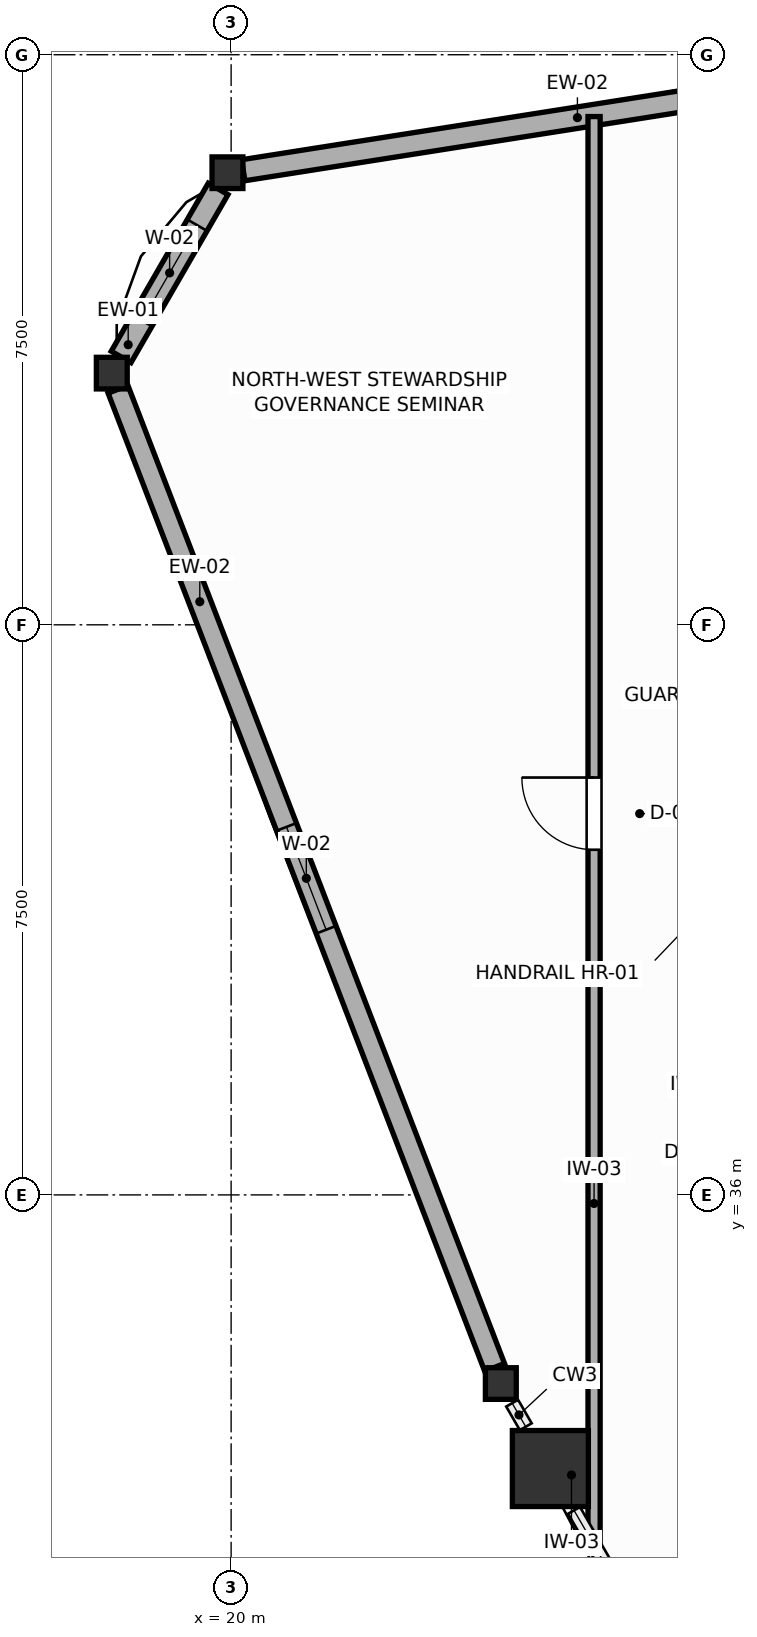
"""IFC4 building model, lengths in metres.
Left out: names, types, materials, properties, quantities, classifications, styles, units other than length and angle.
Written with IfcOpenShell. Run it as: python <this file> out.ifc"""

import sys

from ifc_helpers import new_model, si_unit, direction, frame, frame_2d, origin, origin_2d, place, context, subcontext, project, spatial, rectangle, i_section, extrude, source, transform, mapped, element, fill, save


model = new_model("IFC4")
c1 = context("Model", 3, precision=1e-05, world=origin(), true_north=direction((0.0, 1.0)))
c2 = subcontext(c1, "Body", "Model", "MODEL_VIEW")
j1 = project(units=[si_unit("LENGTHUNIT", "METRE"), si_unit("PLANEANGLEUNIT", "RADIAN")], contexts=[c1])
p1 = place(None, origin())
s1 = spatial("IfcSite", under=j1, at=p1, CompositionType="ELEMENT")
p2 = place(p1, origin())
s2 = spatial("IfcBuilding", under=s1, at=p2, CompositionType="ELEMENT")
p3 = place(p2, frame((0.0, 0.0, 209.4)))
s3 = spatial("IfcBuildingStorey", under=s2, at=p3, CompositionType="ELEMENT", Elevation=209.4)
m1 = source(origin(), c2, "Body", "SweptSolid", [
    extrude(rectangle(XDim=1.0, YDim=1.0, at=origin_2d()), origin(), (0.0, 0.0, 1.0), 3.6),
])
p4 = place(p3, frame((24.2, 32.4, 0.0), z_axis=(0.0, 0.0, 1.0), x_axis=(1.0, 0.0, 0.0)))
e1 = element("IfcColumn", 1, at=p4, inside=s3, PredefinedType="COLUMN", context=c2, shape_type="MappedRepresentation", body=[
    mapped(m1, transform((0.0, 0.0, 0.0), scale=1.0)),
])
m2 = source(origin(), c2, "Body", "SweptSolid", [
    extrude(i_section(OverallWidth=0.406, OverallDepth=0.416, WebThickness=0.027, FlangeThickness=0.044, FilletRadius=0.015, at=origin_2d()), origin(), (0.0, 0.0, 1.0), 3.6),
])
for number, where, z_axis, x_axis in (
    (2, (19.952, 49.448, 0.0), (0.0, 0.0, 1.0), (1.0, 0.0, 0.0)),
    (3, (18.43, 46.811, 0.0), (0.0, 0.0, 1.0), (1.0, 0.0, 0.0)),
    (4, (23.548, 33.518, 0.0), (0.0, 0.0, 1.0), (1.0, 0.0, 0.0)),
):
    element("IfcColumn", number, at=place(p3, frame(where, z_axis=z_axis, x_axis=x_axis)), inside=s3, PredefinedType="COLUMN", context=c2, shape_type="MappedRepresentation", body=[
        mapped(m2, transform((0.0, 0.0, 0.0), scale=1.0)),
    ])
p5 = place(p3, frame((33.815, 51.629, 0.0), z_axis=(0.0, 0.0, 1.0), x_axis=(-0.987848165878, -0.155422009936, 0.0)))
e5 = element("IfcWall", 5, at=p5, inside=s3, PredefinedType="SOLIDWALL", context=c2, shape_type="SweptSolid", body=[
    extrude(rectangle(XDim=13.823, YDim=0.28, at=frame_2d((6.912, 0.0))), origin(), (0.0, 0.0, 1.0), 2.96),
])
p6 = place(p5, frame((3.293, 0.0, 0.75)))
e6 = element("IfcOpeningElement", 6, at=p6, cuts=e5, PredefinedType="OPENING", context=c2, shape_type="SweptSolid", body=[
    extrude(rectangle(XDim=1.45, YDim=1.65, at=frame_2d((0.725, 0.825))), frame((0.0, 0.15, 0.0), z_axis=(0.0, -1.0, 0.0), x_axis=(1.0, 0.0, 0.0)), (0.0, 0.0, 1.0), 0.3),
])
p7 = place(p3, frame((19.829, 49.235, 0.0), z_axis=(0.0, 0.0, 1.0), x_axis=(-0.49990462644, -0.866080460733, 0.0)))
e7 = element("IfcWall", 7, at=p7, inside=s3, PredefinedType="SOLIDWALL", context=c2, shape_type="SweptSolid", body=[
    extrude(rectangle(XDim=2.552, YDim=0.3, at=frame_2d((1.276, 0.0))), origin(), (0.0, 0.0, 1.0), 3.02),
])
p8 = place(p7, frame((0.551, 0.0, 0.75)))
e8 = element("IfcOpeningElement", 8, at=p8, cuts=e7, PredefinedType="OPENING", context=c2, shape_type="SweptSolid", body=[
    extrude(rectangle(XDim=1.45, YDim=1.65, at=frame_2d((0.725, 0.825))), frame((0.0, 0.16, 0.0), z_axis=(0.0, -1.0, 0.0), x_axis=(1.0, 0.0, 0.0)), (0.0, 0.0, 1.0), 0.32),
])
p9 = place(p3, frame((18.512, 46.598, 0.0), z_axis=(0.0, 0.0, 1.0), x_axis=(0.359321962573, -0.933213655715, 0.0)))
e9 = element("IfcWall", 9, at=p9, inside=s3, PredefinedType="SOLIDWALL", context=c2, shape_type="SweptSolid", body=[
    extrude(rectangle(XDim=13.788, YDim=0.28, at=frame_2d((6.894, 0.0))), origin(), (0.0, 0.0, 1.0), 3.02),
])
p10 = place(p9, frame((6.169, 0.0, 0.75)))
e10 = element("IfcOpeningElement", 10, at=p10, cuts=e9, PredefinedType="OPENING", context=c2, shape_type="SweptSolid", body=[
    extrude(rectangle(XDim=1.45, YDim=1.65, at=frame_2d((0.725, 0.825))), frame((0.0, 0.15, 0.0), z_axis=(0.0, -1.0, 0.0), x_axis=(1.0, 0.0, 0.0)), (0.0, 0.0, 1.0), 0.3),
])
p11 = place(p3, frame((24.775, 31.413, 0.0), z_axis=(0.0, 0.0, 1.0), x_axis=(0.0, 1.0, 0.0)))
e11 = element("IfcWall", 11, at=p11, inside=s3, PredefinedType="PARTITIONING", context=c2, shape_type="SweptSolid", body=[
    extrude(rectangle(XDim=18.773, YDim=0.16, at=frame_2d((9.387, 0.0))), origin(), (0.0, 0.0, 1.0), 3.41),
])
p12 = place(p11, frame((9.127, 0.0, 0.0)))
e12 = element("IfcOpeningElement", 12, at=p12, cuts=e11, PredefinedType="OPENING", context=c2, shape_type="SweptSolid", body=[
    extrude(rectangle(XDim=0.95, YDim=2.05, at=frame_2d((0.475, 1.025))), frame((0.0, 0.09, 0.0), z_axis=(0.0, -1.0, 0.0), x_axis=(1.0, 0.0, 0.0)), (0.0, 0.0, 1.0), 0.18),
])
p13 = place(p3, frame((24.263, 32.315, 0.0), z_axis=(0.0, 0.0, 1.0), x_axis=(1.0, 0.0, 0.0)))
e13 = element("IfcWall", 13, at=p13, inside=s3, PredefinedType="PARTITIONING", context=c2, shape_type="SweptSolid", body=[
    extrude(rectangle(XDim=0.43, YDim=0.16, at=frame_2d((0.215, 0.0))), origin(), (0.0, 0.0, 1.0), 2.96),
])
p14 = place(p8, origin())
e14 = element("IfcWindow", 14, at=p14, inside=s3, PartitioningType="SINGLE_PANEL", PredefinedType="WINDOW", context=c2, shape_type="SweptSolid", body=[
    extrude(rectangle(XDim=1.45, YDim=1.65, at=frame_2d((0.725, 0.825))), frame((0.0, 0.03, 0.0), z_axis=(0.0, -1.0, 0.0), x_axis=(1.0, 0.0, 0.0)), (0.0, 0.0, 1.0), 0.06),
])
fill(e8, e14)
p15 = place(p10, origin())
e15 = element("IfcWindow", 15, at=p15, inside=s3, PartitioningType="SINGLE_PANEL", PredefinedType="WINDOW", context=c2, shape_type="SweptSolid", body=[
    extrude(rectangle(XDim=1.45, YDim=1.65, at=frame_2d((0.725, 0.825))), frame((0.0, 0.03, 0.0), z_axis=(0.0, -1.0, 0.0), x_axis=(1.0, 0.0, 0.0)), (0.0, 0.0, 1.0), 0.06),
])
fill(e10, e15)
p16 = place(p12, origin())
e16 = element("IfcDoor", 16, at=p16, inside=s3, OperationType="SINGLE_SWING_RIGHT", PredefinedType="DOOR", context=c2, shape_type="SweptSolid", body=[
    extrude(rectangle(XDim=0.95, YDim=2.05, at=frame_2d((0.475, 1.025))), frame((0.0, 0.025, 0.0), z_axis=(0.0, -1.0, 0.0), x_axis=(1.0, 0.0, 0.0)), (0.0, 0.0, 1.0), 0.05),
])
fill(e12, e16)
save(model, sys.argv[1])
